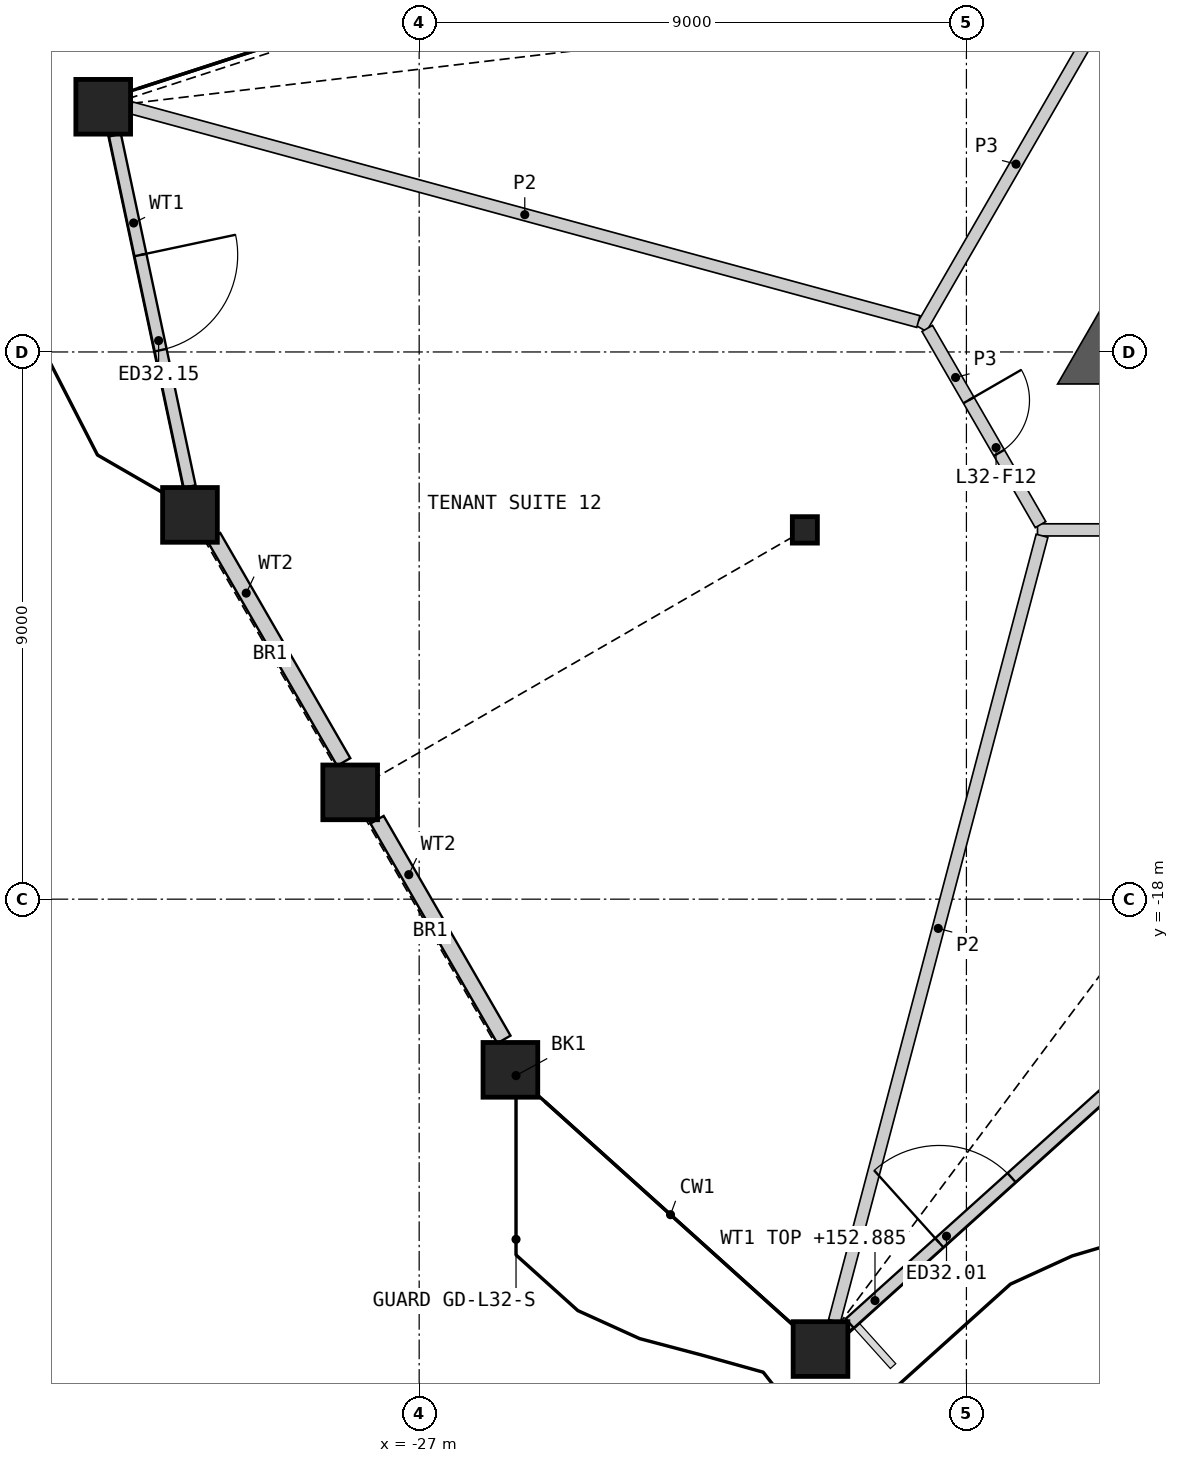
"""IFC4 building model, lengths in metres.
Left out: names, types, materials, properties, quantities, classifications, styles, units other than length and angle.
Written with IfcOpenShell. Run it as: python <this file> out.ifc"""

import sys

from ifc_helpers import new_model, si_unit, direction, frame, frame_2d, origin, origin_2d, place, context, subcontext, project, spatial, polyline, rectangle, hollow_rectangle, i_section, outline, extrude, element, fill, save


model = new_model("IFC4")
c1 = context("Model", 3, precision=1e-05, world=origin(), true_north=direction((0.0, 1.0)))
c2 = subcontext(c1, "Body", "Model", "MODEL_VIEW")
j1 = project(units=[si_unit("LENGTHUNIT", "METRE"), si_unit("PLANEANGLEUNIT", "RADIAN")], contexts=[c1])
p1 = place(None, origin())
s1 = spatial("IfcSite", under=j1, at=p1, CompositionType="ELEMENT")
p2 = place(p1, origin())
s2 = spatial("IfcBuilding", under=s1, at=p2, CompositionType="ELEMENT")
p3 = place(p2, frame((0.0, 0.0, 150.0)))
s3 = spatial("IfcBuildingStorey", under=s2, at=p3, CompositionType="ELEMENT", Elevation=150.0)
for number, where, z_axis, x_axis in (
    (1, (-25.5, -20.807, 0.0), (0.0, 0.0, 1.0), (1.0, 0.0, 0.0)),
    (2, (-20.4, -25.399, 0.0), (0.0, 0.0, 1.0), (1.0, 0.0, 0.0)),
    (3, (-32.196, -4.967, 0.0), (0.0, 0.0, 1.0), (1.0, 0.0, 0.0)),
    (4, (-30.769, -11.68, 0.0), (0.0, 0.0, 1.0), (1.0, 0.0, 0.0)),
    (5, (-28.135, -16.243, 0.0), (0.0, 0.0, 1.0), (1.0, 0.0, 0.0)),
):
    element("IfcColumn", number, at=place(p3, frame(where, z_axis=z_axis, x_axis=x_axis)), inside=s3, PredefinedType="COLUMN", context=c2, shape_type="SweptSolid", body=[
        extrude(hollow_rectangle(XDim=0.9, YDim=0.9, WallThickness=0.06, at=origin_2d()), origin(), (0.0, 0.0, 1.0), 4.2),
    ])
p4 = place(p3, frame((-20.657, -11.926, 0.0), z_axis=(0.0, 0.0, 1.0), x_axis=(1.0, 0.0, 0.0)))
e6 = element("IfcColumn", 6, at=p4, inside=s3, PredefinedType="COLUMN", context=c2, shape_type="SweptSolid", body=[
    extrude(i_section(OverallWidth=0.412, OverallDepth=0.435, WebThickness=0.036, FlangeThickness=0.057, at=origin_2d()), origin(), (0.0, 0.0, 1.0), 4.2),
])
p5 = place(p3, frame((-19.92, -24.977, 0.0), z_axis=(0.0, 0.0, 1.0), x_axis=(0.743146822591, 0.669128388333, 0.0)))
e7 = element("IfcWall", 7, at=p5, inside=s3, PredefinedType="SOLIDWALL", context=c2, shape_type="SweptSolid", body=[
    extrude(rectangle(XDim=5.604, YDim=0.2, at=frame_2d((2.802, 0.0))), origin(), (0.0, 0.0, 1.0), 2.885),
])
p6 = place(p5, frame((1.983, 0.0, 0.0)))
e8 = element("IfcOpeningElement", 8, at=p6, cuts=e7, PredefinedType="OPENING", context=c2, shape_type="SweptSolid", body=[
    extrude(rectangle(XDim=1.6, YDim=2.4, at=frame_2d((0.8, 1.2))), frame((0.0, 0.11, 0.0), z_axis=(0.0, -1.0, 0.0), x_axis=(1.0, 0.0, 0.0)), (0.0, 0.0, 1.0), 0.22),
])
p7 = place(p3, frame((-32.003, -5.434, 0.0), z_axis=(0.0, 0.0, 1.0), x_axis=(0.207886430801, -0.978152969575, 0.0)))
e9 = element("IfcWall", 9, at=p7, inside=s3, PredefinedType="SOLIDWALL", context=c2, shape_type="SweptSolid", body=[
    extrude(rectangle(XDim=5.908, YDim=0.2, at=frame_2d((2.954, 0.0))), origin(), (0.0, 0.0, 1.0), 3.189),
])
p8 = place(p7, frame((2.015, 0.0, 0.0)))
e10 = element("IfcOpeningElement", 10, at=p8, cuts=e9, PredefinedType="OPENING", context=c2, shape_type="SweptSolid", body=[
    extrude(rectangle(XDim=1.6, YDim=2.4, at=frame_2d((0.8, 1.2))), frame((0.0, 0.11, 0.0), z_axis=(0.0, -1.0, 0.0), x_axis=(1.0, 0.0, 0.0)), (0.0, 0.0, 1.0), 0.22),
])
p9 = place(p3, frame((-30.379, -12.041, 0.0), z_axis=(0.0, 0.0, 1.0), x_axis=(0.499995966399, -0.866027732573, 0.0)))
e11 = element("IfcWall", 11, at=p9, inside=s3, PredefinedType="SOLIDWALL", context=c2, shape_type="SweptSolid", body=[
    extrude(rectangle(XDim=4.275, YDim=0.25, at=frame_2d((2.138, 0.0))), origin(), (0.0, 0.0, 1.0), 3.189),
])
p10 = place(p3, frame((-27.692, -16.693, 0.0), z_axis=(0.0, 0.0, 1.0), x_axis=(0.500002690545, -0.866023850392, 0.0)))
e12 = element("IfcWall", 12, at=p10, inside=s3, PredefinedType="SOLIDWALL", context=c2, shape_type="SweptSolid", body=[
    extrude(rectangle(XDim=4.173, YDim=0.25, at=frame_2d((2.086, 0.0))), origin(), (0.0, 0.0, 1.0), 3.189),
])
p11 = place(p3, origin())
e13 = element("IfcWall", 13, at=p11, inside=s3, PredefinedType="SHEAR", context=c2, shape_type="SweptSolid", body=[
    extrude(outline(polyline([(-14.941, -8.626), (-14.941, -9.526), (-16.5, -9.526), (-15.721, -8.176), (-14.941, -8.626)])), origin(), (0.0, 0.0, 1.0), 3.8),
])
p12 = place(p3, frame((-16.831, -11.926, 0.0), z_axis=(0.0, 0.0, 1.0), x_axis=(1.0, 0.0, 0.0)))
e14 = element("IfcWall", 14, at=p12, inside=s3, PredefinedType="PARTITIONING", context=c2, shape_type="SweptSolid", body=[
    extrude(rectangle(XDim=6.275, YDim=0.2, at=frame_2d((3.137, 0.0))), origin(), (0.0, 0.0, 1.0), 3.8),
])
p13 = place(p12, frame((2.289, 0.0, 0.0)))
e15 = element("IfcOpeningElement", 15, at=p13, cuts=e14, PredefinedType="OPENING", context=c2, shape_type="SweptSolid", body=[
    extrude(rectangle(XDim=1.8, YDim=2.1, at=frame_2d((0.9, 1.05))), frame((0.0, 0.11, 0.0), z_axis=(0.0, -1.0, 0.0), x_axis=(1.0, 0.0, 0.0)), (0.0, 0.0, 1.0), 0.22),
])
p14 = place(p3, frame((-18.744, -8.613, 0.0), z_axis=(0.0, 0.0, 1.0), x_axis=(0.499997920671, 0.866026604282, 0.0)))
e16 = element("IfcWall", 16, at=p14, inside=s3, PredefinedType="PARTITIONING", context=c2, shape_type="SweptSolid", body=[
    extrude(rectangle(XDim=6.24, YDim=0.2, at=frame_2d((3.12, 0.0))), origin(), (0.0, 0.0, 1.0), 3.8),
])
p15 = place(p3, frame((-18.644, -8.613, 0.0), z_axis=(0.0, 0.0, 1.0), x_axis=(0.499958791762, -0.866049194065, 0.0)))
e17 = element("IfcWall", 17, at=p15, inside=s3, PredefinedType="PARTITIONING", context=c2, shape_type="SweptSolid", body=[
    extrude(rectangle(XDim=3.726, YDim=0.2, at=frame_2d((1.863, 0.0))), origin(), (0.0, 0.0, 1.0), 3.8),
])
p16 = place(p15, frame((1.363, 0.0, 0.0)))
e18 = element("IfcOpeningElement", 18, at=p16, cuts=e17, PredefinedType="OPENING", context=c2, shape_type="SweptSolid", body=[
    extrude(rectangle(XDim=1.0, YDim=2.1, at=frame_2d((0.5, 1.05))), frame((0.0, 0.11, 0.0), z_axis=(0.0, -1.0, 0.0), x_axis=(1.0, 0.0, 0.0)), (0.0, 0.0, 1.0), 0.22),
])
p17 = place(p3, frame((-31.736, -4.984, 0.0), z_axis=(0.0, 0.0, 1.0), x_axis=(0.965038802525, -0.262107057556, 0.0)))
e19 = element("IfcWall", 19, at=p17, inside=s3, PredefinedType="PARTITIONING", context=c2, shape_type="SweptSolid", body=[
    extrude(rectangle(XDim=13.415, YDim=0.2, at=frame_2d((6.708, 0.0))), origin(), (0.0, 0.0, 1.0), 2.885),
])
p18 = place(p3, frame((-20.17, -24.939, 0.0), z_axis=(0.0, 0.0, 1.0), x_axis=(0.25554647156, 0.966796773305, 0.0)))
e20 = element("IfcWall", 20, at=p18, inside=s3, PredefinedType="PARTITIONING", context=c2, shape_type="SweptSolid", body=[
    extrude(rectangle(XDim=13.36, YDim=0.2, at=frame_2d((6.68, 0.0))), origin(), (0.0, 0.0, 1.0), 2.885),
])
p19 = place(p6, origin())
e21 = element("IfcDoor", 21, at=p19, inside=s3, OperationType="DOUBLE_DOOR_SINGLE_SWING", PredefinedType="DOOR", context=c2, shape_type="SweptSolid", body=[
    extrude(rectangle(XDim=1.6, YDim=2.4, at=frame_2d((0.8, 1.2))), frame((0.0, 0.025, 0.0), z_axis=(0.0, -1.0, 0.0), x_axis=(1.0, 0.0, 0.0)), (0.0, 0.0, 1.0), 0.05),
])
fill(e8, e21)
p20 = place(p8, origin())
e22 = element("IfcDoor", 22, at=p20, inside=s3, OperationType="DOUBLE_DOOR_SINGLE_SWING", PredefinedType="DOOR", context=c2, shape_type="SweptSolid", body=[
    extrude(rectangle(XDim=1.6, YDim=2.4, at=frame_2d((0.8, 1.2))), frame((0.0, 0.025, 0.0), z_axis=(0.0, -1.0, 0.0), x_axis=(1.0, 0.0, 0.0)), (0.0, 0.0, 1.0), 0.05),
])
fill(e10, e22)
p21 = place(p16, origin())
e23 = element("IfcDoor", 23, at=p21, inside=s3, OperationType="SINGLE_SWING_LEFT", PredefinedType="DOOR", context=c2, shape_type="SweptSolid", body=[
    extrude(rectangle(XDim=1.0, YDim=2.1, at=frame_2d((0.5, 1.05))), frame((0.0, 0.025, 0.0), z_axis=(0.0, -1.0, 0.0), x_axis=(1.0, 0.0, 0.0)), (0.0, 0.0, 1.0), 0.05),
])
fill(e18, e23)
save(model, sys.argv[1])
